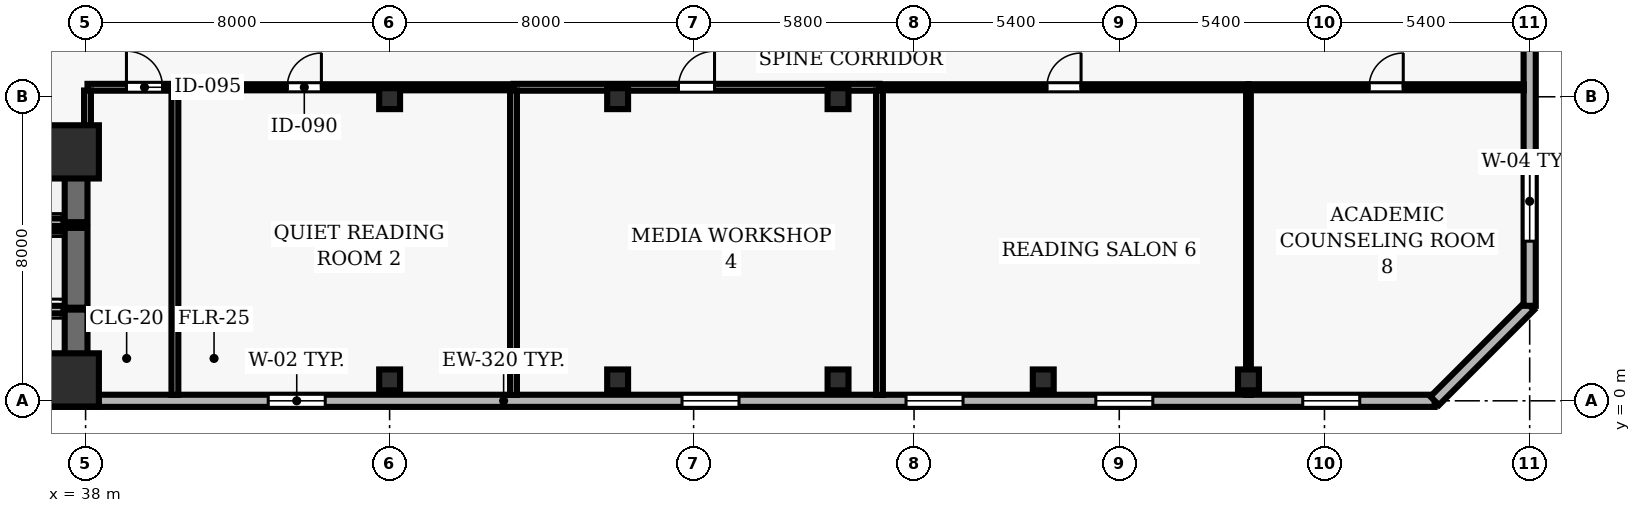
"""IFC4 building model, lengths in metres.
Left out: names, types, materials, properties, quantities, classifications, styles, units other than length and angle.
Written with IfcOpenShell. Run it as: python <this file> out.ifc"""

import sys

from ifc_helpers import new_model, si_unit, direction, frame, frame_2d, origin, origin_2d, place, context, subcontext, project, spatial, rectangle, hollow_rectangle, extrude, element, fill, save


model = new_model("IFC4")
c1 = context("Model", 3, precision=1e-05, world=origin(), true_north=direction((0.0, 1.0)))
c2 = subcontext(c1, "Body", "Model", "MODEL_VIEW")
j1 = project(units=[si_unit("LENGTHUNIT", "METRE"), si_unit("PLANEANGLEUNIT", "RADIAN")], contexts=[c1])
p1 = place(None, origin())
s1 = spatial("IfcSite", under=j1, at=p1, CompositionType="ELEMENT")
p2 = place(p1, origin())
s2 = spatial("IfcBuilding", under=s1, at=p2, CompositionType="ELEMENT")
p3 = place(p2, frame((0.0, 0.0, 58.3)))
s3 = spatial("IfcBuildingStorey", under=s2, at=p3, CompositionType="ELEMENT", Elevation=58.3)
for number, where, z_axis, x_axis in (
    (1, (37.65, 0.55, 0.0), (0.0, 0.0, 1.0), (1.0, 0.0, 0.0)),
    (2, (37.65, 6.55, 0.0), (0.0, 0.0, 1.0), (1.0, 0.0, 0.0)),
):
    element("IfcColumn", number, at=place(p3, frame(where, z_axis=z_axis, x_axis=x_axis)), inside=s3, PredefinedType="COLUMN", context=c2, shape_type="SweptSolid", body=[
        extrude(rectangle(XDim=1.4, YDim=1.4, at=origin_2d()), origin(), (0.0, 0.0, 1.0), 3.9),
    ])
for number, where, z_axis, x_axis in (
    (3, (46.0, 0.55, 0.0), (0.0, 0.0, 1.0), (1.0, 0.0, 0.0)),
    (4, (46.0, 7.95, 0.0), (0.0, 0.0, 1.0), (1.0, 0.0, 0.0)),
    (5, (52.0, 0.55, 0.0), (0.0, 0.0, 1.0), (1.0, 0.0, 0.0)),
    (6, (52.0, 7.95, 0.0), (0.0, 0.0, 1.0), (1.0, 0.0, 0.0)),
    (7, (57.8, 0.55, 0.0), (0.0, 0.0, 1.0), (1.0, 0.0, 0.0)),
    (8, (57.8, 7.95, 0.0), (0.0, 0.0, 1.0), (1.0, 0.0, 0.0)),
    (9, (63.2, 0.55, 0.0), (0.0, 0.0, 1.0), (1.0, 0.0, 0.0)),
    (10, (68.6, 0.55, 0.0), (0.0, 0.0, 1.0), (1.0, 0.0, 0.0)),
):
    element("IfcColumn", number, at=place(p3, frame(where, z_axis=z_axis, x_axis=x_axis)), inside=s3, PredefinedType="COLUMN", context=c2, shape_type="SweptSolid", body=[
        extrude(hollow_rectangle(XDim=0.55, YDim=0.55, WallThickness=0.025, at=origin_2d()), origin(), (0.0, 0.0, 1.0), 3.9),
    ])
p4 = place(p3, frame((24.5, 0.0, 0.0), z_axis=(0.0, 0.0, 1.0), x_axis=(1.0, 0.0, 0.0)))
e11 = element("IfcWall", 11, at=p4, inside=s3, PredefinedType="SOLIDWALL", context=c2, shape_type="SweptSolid", body=[
    extrude(rectangle(XDim=49.0, YDim=0.32, at=frame_2d((24.5, 0.0))), origin(), (0.0, 0.0, 1.0), 3.69),
])
p5 = place(p4, frame((1.972, 0.0, 0.9)))
e12 = element("IfcOpeningElement", 12, at=p5, cuts=e11, PredefinedType="OPENING", context=c2, shape_type="SweptSolid", body=[
    extrude(rectangle(XDim=1.5, YDim=1.6, at=frame_2d((0.75, 0.8))), frame((0.0, 0.17, 0.0), z_axis=(0.0, -1.0, 0.0), x_axis=(1.0, 0.0, 0.0)), (0.0, 0.0, 1.0), 0.34),
])
p6 = place(p4, frame((8.317, 0.0, 0.9)))
e13 = element("IfcOpeningElement", 13, at=p6, cuts=e11, PredefinedType="OPENING", context=c2, shape_type="SweptSolid", body=[
    extrude(rectangle(XDim=1.5, YDim=1.6, at=frame_2d((0.75, 0.8))), frame((0.0, 0.17, 0.0), z_axis=(0.0, -1.0, 0.0), x_axis=(1.0, 0.0, 0.0)), (0.0, 0.0, 1.0), 0.34),
])
p7 = place(p4, frame((18.306, 0.0, 0.9)))
e14 = element("IfcOpeningElement", 14, at=p7, cuts=e11, PredefinedType="OPENING", context=c2, shape_type="SweptSolid", body=[
    extrude(rectangle(XDim=1.5, YDim=1.6, at=frame_2d((0.75, 0.8))), frame((0.0, 0.17, 0.0), z_axis=(0.0, -1.0, 0.0), x_axis=(1.0, 0.0, 0.0)), (0.0, 0.0, 1.0), 0.34),
])
p8 = place(p4, frame((29.194, 0.0, 0.9)))
e15 = element("IfcOpeningElement", 15, at=p8, cuts=e11, PredefinedType="OPENING", context=c2, shape_type="SweptSolid", body=[
    extrude(rectangle(XDim=1.5, YDim=1.6, at=frame_2d((0.75, 0.8))), frame((0.0, 0.17, 0.0), z_axis=(0.0, -1.0, 0.0), x_axis=(1.0, 0.0, 0.0)), (0.0, 0.0, 1.0), 0.34),
])
p9 = place(p4, frame((35.089, 0.0, 0.9)))
e16 = element("IfcOpeningElement", 16, at=p9, cuts=e11, PredefinedType="OPENING", context=c2, shape_type="SweptSolid", body=[
    extrude(rectangle(XDim=1.5, YDim=1.6, at=frame_2d((0.75, 0.8))), frame((0.0, 0.17, 0.0), z_axis=(0.0, -1.0, 0.0), x_axis=(1.0, 0.0, 0.0)), (0.0, 0.0, 1.0), 0.34),
])
p10 = place(p4, frame((40.083, 0.0, 0.9)))
e17 = element("IfcOpeningElement", 17, at=p10, cuts=e11, PredefinedType="OPENING", context=c2, shape_type="SweptSolid", body=[
    extrude(rectangle(XDim=1.5, YDim=1.6, at=frame_2d((0.75, 0.8))), frame((0.0, 0.17, 0.0), z_axis=(0.0, -1.0, 0.0), x_axis=(1.0, 0.0, 0.0)), (0.0, 0.0, 1.0), 0.34),
])
p11 = place(p4, frame((45.528, 0.0, 0.9)))
e18 = element("IfcOpeningElement", 18, at=p11, cuts=e11, PredefinedType="OPENING", context=c2, shape_type="SweptSolid", body=[
    extrude(rectangle(XDim=1.5, YDim=1.6, at=frame_2d((0.75, 0.8))), frame((0.0, 0.17, 0.0), z_axis=(0.0, -1.0, 0.0), x_axis=(1.0, 0.0, 0.0)), (0.0, 0.0, 1.0), 0.34),
])
p12 = place(p3, frame((73.5, 0.0, 0.0), z_axis=(0.0, 0.0, 1.0), x_axis=(0.707106781187, 0.707106781187, 0.0)))
e19 = element("IfcWall", 19, at=p12, inside=s3, PredefinedType="SOLIDWALL", context=c2, shape_type="SweptSolid", body=[
    extrude(rectangle(XDim=3.536, YDim=0.32, at=frame_2d((1.768, 0.0))), origin(), (0.0, 0.0, 1.0), 3.69),
])
p13 = place(p3, frame((76.0, 2.5, 0.0), z_axis=(0.0, 0.0, 1.0), x_axis=(0.0, 1.0, 0.0)))
e20 = element("IfcWall", 20, at=p13, inside=s3, PredefinedType="SOLIDWALL", context=c2, shape_type="SweptSolid", body=[
    extrude(rectangle(XDim=11.0, YDim=0.32, at=frame_2d((5.5, 0.0))), origin(), (0.0, 0.0, 1.0), 3.69),
])
p14 = place(p13, frame((1.7, 0.0, 0.9)))
e21 = element("IfcOpeningElement", 21, at=p14, cuts=e20, PredefinedType="OPENING", context=c2, shape_type="SweptSolid", body=[
    extrude(rectangle(XDim=2.1, YDim=1.6, at=frame_2d((1.05, 0.8))), frame((0.0, 0.17, 0.0), z_axis=(0.0, -1.0, 0.0), x_axis=(1.0, 0.0, 0.0)), (0.0, 0.0, 1.0), 0.34),
])
p15 = place(p3, frame((37.75, 0.3, 0.0), z_axis=(0.0, 0.0, 1.0), x_axis=(0.0, 1.0, 0.0)))
e22 = element("IfcWall", 22, at=p15, inside=s3, PredefinedType="SHEAR", context=c2, shape_type="SweptSolid", body=[
    extrude(rectangle(XDim=2.1, YDim=0.6, at=frame_2d((1.05, 0.0))), origin(), (0.0, 0.0, 1.0), 3.69),
])
for number, where, z_axis, x_axis in (
    (23, (35.28, 0.3, 0.0), (0.0, 0.0, 1.0), (1.0, 0.0, 0.0)),
    (24, (37.42, 2.4, 0.0), (0.0, 0.0, 1.0), (-1.0, 0.0, 0.0)),
):
    element("IfcWall", number, at=place(p3, frame(where, z_axis=z_axis, x_axis=x_axis)), inside=s3, PredefinedType="SOLIDWALL", context=c2, shape_type="SweptSolid", body=[
        extrude(rectangle(XDim=2.14, YDim=0.2, at=frame_2d((1.07, 0.0))), origin(), (0.0, 0.0, 1.0), 3.69),
    ])
p16 = place(p3, frame((37.75, 2.45, 0.0), z_axis=(0.0, 0.0, 1.0), x_axis=(0.0, 1.0, 0.0)))
e25 = element("IfcWall", 25, at=p16, inside=s3, PredefinedType="SHEAR", context=c2, shape_type="SweptSolid", body=[
    extrude(rectangle(XDim=2.1, YDim=0.6, at=frame_2d((1.05, 0.0))), origin(), (0.0, 0.0, 1.0), 3.69),
])
p17 = place(p3, frame((37.42, 4.55, 0.0), z_axis=(0.0, 0.0, 1.0), x_axis=(-1.0, 0.0, 0.0)))
e26 = element("IfcWall", 26, at=p17, inside=s3, PredefinedType="SOLIDWALL", context=c2, shape_type="SweptSolid", body=[
    extrude(rectangle(XDim=2.14, YDim=0.2, at=frame_2d((1.07, 0.0))), origin(), (0.0, 0.0, 1.0), 3.69),
])
p18 = place(p3, frame((37.75, 4.7, 0.0), z_axis=(0.0, 0.0, 1.0), x_axis=(0.0, 1.0, 0.0)))
e27 = element("IfcWall", 27, at=p18, inside=s3, PredefinedType="SHEAR", context=c2, shape_type="SweptSolid", body=[
    extrude(rectangle(XDim=2.25, YDim=0.6, at=frame_2d((1.125, 0.0))), origin(), (0.0, 0.0, 1.0), 3.69),
])
for number, where, z_axis, x_axis in (
    (28, (35.28, 4.7, 0.0), (0.0, 0.0, 1.0), (1.0, 0.0, 0.0)),
    (29, (37.42, 6.95, 0.0), (0.0, 0.0, 1.0), (-1.0, 0.0, 0.0)),
):
    element("IfcWall", number, at=place(p3, frame(where, z_axis=z_axis, x_axis=x_axis)), inside=s3, PredefinedType="SOLIDWALL", context=c2, shape_type="SweptSolid", body=[
        extrude(rectangle(XDim=2.14, YDim=0.2, at=frame_2d((1.07, 0.0))), origin(), (0.0, 0.0, 1.0), 3.69),
    ])
p19 = place(p3, frame((38.05, 8.25, 0.0), z_axis=(0.0, 0.0, 1.0), x_axis=(1.0, 0.0, 0.0)))
e30 = element("IfcWall", 30, at=p19, inside=s3, PredefinedType="PARTITIONING", context=c2, shape_type="SweptSolid", body=[
    extrude(rectangle(XDim=2.3, YDim=0.18, at=frame_2d((1.15, 0.0))), origin(), (0.0, 0.0, 1.0), 3.055),
])
p20 = place(p19, frame((1.025, 0.0, 0.0)))
e31 = element("IfcOpeningElement", 31, at=p20, cuts=e30, PredefinedType="OPENING", context=c2, shape_type="SweptSolid", body=[
    extrude(rectangle(XDim=0.95, YDim=2.1, at=frame_2d((0.475, 1.05))), frame((0.0, 0.1, 0.0), z_axis=(0.0, -1.0, 0.0), x_axis=(1.0, 0.0, 0.0)), (0.0, 0.0, 1.0), 0.2),
])
p21 = place(p3, frame((40.35, 8.25, 0.0), z_axis=(0.0, 0.0, 1.0), x_axis=(1.0, 0.0, 0.0)))
e32 = element("IfcWall", 32, at=p21, inside=s3, PredefinedType="PARTITIONING", context=c2, shape_type="SweptSolid", body=[
    extrude(rectangle(XDim=8.91, YDim=0.16, at=frame_2d((4.455, 0.0))), origin(), (0.0, 0.0, 1.0), 3.055),
])
p22 = place(p21, frame((2.955, 0.0, 0.0)))
e33 = element("IfcOpeningElement", 33, at=p22, cuts=e32, PredefinedType="OPENING", context=c2, shape_type="SweptSolid", body=[
    extrude(rectangle(XDim=0.9, YDim=2.1, at=frame_2d((0.45, 1.05))), frame((0.0, 0.09, 0.0), z_axis=(0.0, -1.0, 0.0), x_axis=(1.0, 0.0, 0.0)), (0.0, 0.0, 1.0), 0.18),
])
p23 = place(p3, frame((49.26, 8.25, 0.0), z_axis=(0.0, 0.0, 1.0), x_axis=(1.0, 0.0, 0.0)))
e34 = element("IfcWall", 34, at=p23, inside=s3, PredefinedType="PARTITIONING", context=c2, shape_type="SweptSolid", body=[
    extrude(rectangle(XDim=9.63, YDim=0.18, at=frame_2d((4.815, 0.0))), origin(), (0.0, 0.0, 1.0), 3.055),
])
p24 = place(p23, frame((4.34, 0.0, 0.0)))
e35 = element("IfcOpeningElement", 35, at=p24, cuts=e34, PredefinedType="OPENING", context=c2, shape_type="SweptSolid", body=[
    extrude(rectangle(XDim=0.95, YDim=2.1, at=frame_2d((0.475, 1.05))), frame((0.0, 0.1, 0.0), z_axis=(0.0, -1.0, 0.0), x_axis=(1.0, 0.0, 0.0)), (0.0, 0.0, 1.0), 0.2),
])
p25 = place(p3, frame((58.89, 8.25, 0.0), z_axis=(0.0, 0.0, 1.0), x_axis=(1.0, 0.0, 0.0)))
e36 = element("IfcWall", 36, at=p25, inside=s3, PredefinedType="PARTITIONING", context=c2, shape_type="SweptSolid", body=[
    extrude(rectangle(XDim=9.71, YDim=0.16, at=frame_2d((4.855, 0.0))), origin(), (0.0, 0.0, 1.0), 3.69),
])
p26 = place(p25, frame((4.405, 0.0, 0.0)))
e37 = element("IfcOpeningElement", 37, at=p26, cuts=e36, PredefinedType="OPENING", context=c2, shape_type="SweptSolid", body=[
    extrude(rectangle(XDim=0.9, YDim=2.1, at=frame_2d((0.45, 1.05))), frame((0.0, 0.09, 0.0), z_axis=(0.0, -1.0, 0.0), x_axis=(1.0, 0.0, 0.0)), (0.0, 0.0, 1.0), 0.18),
])
p27 = place(p3, frame((68.6, 8.25, 0.0), z_axis=(0.0, 0.0, 1.0), x_axis=(1.0, 0.0, 0.0)))
e38 = element("IfcWall", 38, at=p27, inside=s3, PredefinedType="PARTITIONING", context=c2, shape_type="SweptSolid", body=[
    extrude(rectangle(XDim=7.245, YDim=0.16, at=frame_2d((3.623, 0.0))), origin(), (0.0, 0.0, 1.0), 3.69),
])
p28 = place(p27, frame((3.173, 0.0, 0.0)))
e39 = element("IfcOpeningElement", 39, at=p28, cuts=e38, PredefinedType="OPENING", context=c2, shape_type="SweptSolid", body=[
    extrude(rectangle(XDim=0.9, YDim=2.1, at=frame_2d((0.45, 1.05))), frame((0.0, 0.09, 0.0), z_axis=(0.0, -1.0, 0.0), x_axis=(1.0, 0.0, 0.0)), (0.0, 0.0, 1.0), 0.18),
])
p29 = place(p3, frame((38.05, 7.05, 0.0), z_axis=(0.0, 0.0, 1.0), x_axis=(0.0, 1.0, 0.0)))
e40 = element("IfcWall", 40, at=p29, inside=s3, PredefinedType="PARTITIONING", context=c2, shape_type="SweptSolid", body=[
    extrude(rectangle(XDim=1.115, YDim=0.18, at=frame_2d((0.558, 0.0))), origin(), (0.0, 0.0, 1.0), 3.055),
])
for number, where, z_axis, x_axis in (
    (41, (40.35, 0.155, 0.0), (0.0, 0.0, 1.0), (0.0, 1.0, 0.0)),
    (42, (49.26, 0.155, 0.0), (0.0, 0.0, 1.0), (0.0, 1.0, 0.0)),
    (43, (58.89, 0.155, 0.0), (0.0, 0.0, 1.0), (0.0, 1.0, 0.0)),
):
    element("IfcWall", number, at=place(p3, frame(where, z_axis=z_axis, x_axis=x_axis)), inside=s3, PredefinedType="PARTITIONING", context=c2, shape_type="SweptSolid", body=[
        extrude(rectangle(XDim=8.01, YDim=0.18, at=frame_2d((4.005, 0.0))), origin(), (0.0, 0.0, 1.0), 3.69),
    ])
p30 = place(p3, frame((68.6, 0.155, 0.0), z_axis=(0.0, 0.0, 1.0), x_axis=(0.0, 1.0, 0.0)))
e44 = element("IfcWall", 44, at=p30, inside=s3, PredefinedType="PARTITIONING", context=c2, shape_type="SweptSolid", body=[
    extrude(rectangle(XDim=8.02, YDim=0.125, at=frame_2d((4.01, 0.0))), origin(), (0.0, 0.0, 1.0), 3.055),
])
p31 = place(p7, origin())
e45 = element("IfcWindow", 45, at=p31, inside=s3, PartitioningType="SINGLE_PANEL", PredefinedType="WINDOW", context=c2, shape_type="SweptSolid", body=[
    extrude(rectangle(XDim=1.5, YDim=1.6, at=frame_2d((0.75, 0.8))), frame((0.0, 0.03, 0.0), z_axis=(0.0, -1.0, 0.0), x_axis=(1.0, 0.0, 0.0)), (0.0, 0.0, 1.0), 0.06),
])
fill(e14, e45)
p32 = place(p8, origin())
e46 = element("IfcWindow", 46, at=p32, inside=s3, PartitioningType="SINGLE_PANEL", PredefinedType="WINDOW", context=c2, shape_type="SweptSolid", body=[
    extrude(rectangle(XDim=1.5, YDim=1.6, at=frame_2d((0.75, 0.8))), frame((0.0, 0.03, 0.0), z_axis=(0.0, -1.0, 0.0), x_axis=(1.0, 0.0, 0.0)), (0.0, 0.0, 1.0), 0.06),
])
fill(e15, e46)
p33 = place(p9, origin())
e47 = element("IfcWindow", 47, at=p33, inside=s3, PartitioningType="SINGLE_PANEL", PredefinedType="WINDOW", context=c2, shape_type="SweptSolid", body=[
    extrude(rectangle(XDim=1.5, YDim=1.6, at=frame_2d((0.75, 0.8))), frame((0.0, 0.03, 0.0), z_axis=(0.0, -1.0, 0.0), x_axis=(1.0, 0.0, 0.0)), (0.0, 0.0, 1.0), 0.06),
])
fill(e16, e47)
p34 = place(p10, origin())
e48 = element("IfcWindow", 48, at=p34, inside=s3, PartitioningType="SINGLE_PANEL", PredefinedType="WINDOW", context=c2, shape_type="SweptSolid", body=[
    extrude(rectangle(XDim=1.5, YDim=1.6, at=frame_2d((0.75, 0.8))), frame((0.0, 0.03, 0.0), z_axis=(0.0, -1.0, 0.0), x_axis=(1.0, 0.0, 0.0)), (0.0, 0.0, 1.0), 0.06),
])
fill(e17, e48)
p35 = place(p11, origin())
e49 = element("IfcWindow", 49, at=p35, inside=s3, PartitioningType="SINGLE_PANEL", PredefinedType="WINDOW", context=c2, shape_type="SweptSolid", body=[
    extrude(rectangle(XDim=1.5, YDim=1.6, at=frame_2d((0.75, 0.8))), frame((0.0, 0.03, 0.0), z_axis=(0.0, -1.0, 0.0), x_axis=(1.0, 0.0, 0.0)), (0.0, 0.0, 1.0), 0.06),
])
fill(e18, e49)
p36 = place(p14, origin())
e50 = element("IfcWindow", 50, at=p36, inside=s3, PartitioningType="SINGLE_PANEL", PredefinedType="WINDOW", context=c2, shape_type="SweptSolid", body=[
    extrude(rectangle(XDim=2.1, YDim=1.6, at=frame_2d((1.05, 0.8))), frame((0.0, 0.03, 0.0), z_axis=(0.0, -1.0, 0.0), x_axis=(1.0, 0.0, 0.0)), (0.0, 0.0, 1.0), 0.06),
])
fill(e21, e50)
p37 = place(p20, origin())
e51 = element("IfcDoor", 51, at=p37, inside=s3, OperationType="SINGLE_SWING_LEFT", PredefinedType="DOOR", context=c2, shape_type="SweptSolid", body=[
    extrude(rectangle(XDim=0.95, YDim=2.1, at=frame_2d((0.475, 1.05))), frame((0.0, 0.025, 0.0), z_axis=(0.0, -1.0, 0.0), x_axis=(1.0, 0.0, 0.0)), (0.0, 0.0, 1.0), 0.05),
])
fill(e31, e51)
p38 = place(p22, origin())
e52 = element("IfcDoor", 52, at=p38, inside=s3, OperationType="SINGLE_SWING_RIGHT", PredefinedType="DOOR", context=c2, shape_type="SweptSolid", body=[
    extrude(rectangle(XDim=0.9, YDim=2.1, at=frame_2d((0.45, 1.05))), frame((0.0, 0.025, 0.0), z_axis=(0.0, -1.0, 0.0), x_axis=(1.0, 0.0, 0.0)), (0.0, 0.0, 1.0), 0.05),
])
fill(e33, e52)
p39 = place(p24, origin())
e53 = element("IfcDoor", 53, at=p39, inside=s3, OperationType="SINGLE_SWING_RIGHT", PredefinedType="DOOR", context=c2, shape_type="SweptSolid", body=[
    extrude(rectangle(XDim=0.95, YDim=2.1, at=frame_2d((0.475, 1.05))), frame((0.0, 0.025, 0.0), z_axis=(0.0, -1.0, 0.0), x_axis=(1.0, 0.0, 0.0)), (0.0, 0.0, 1.0), 0.05),
])
fill(e35, e53)
p40 = place(p26, origin())
e54 = element("IfcDoor", 54, at=p40, inside=s3, OperationType="SINGLE_SWING_RIGHT", PredefinedType="DOOR", context=c2, shape_type="SweptSolid", body=[
    extrude(rectangle(XDim=0.9, YDim=2.1, at=frame_2d((0.45, 1.05))), frame((0.0, 0.025, 0.0), z_axis=(0.0, -1.0, 0.0), x_axis=(1.0, 0.0, 0.0)), (0.0, 0.0, 1.0), 0.05),
])
fill(e37, e54)
p41 = place(p28, origin())
e55 = element("IfcDoor", 55, at=p41, inside=s3, OperationType="SINGLE_SWING_RIGHT", PredefinedType="DOOR", context=c2, shape_type="SweptSolid", body=[
    extrude(rectangle(XDim=0.9, YDim=2.1, at=frame_2d((0.45, 1.05))), frame((0.0, 0.025, 0.0), z_axis=(0.0, -1.0, 0.0), x_axis=(1.0, 0.0, 0.0)), (0.0, 0.0, 1.0), 0.05),
])
fill(e39, e55)
save(model, sys.argv[1])
